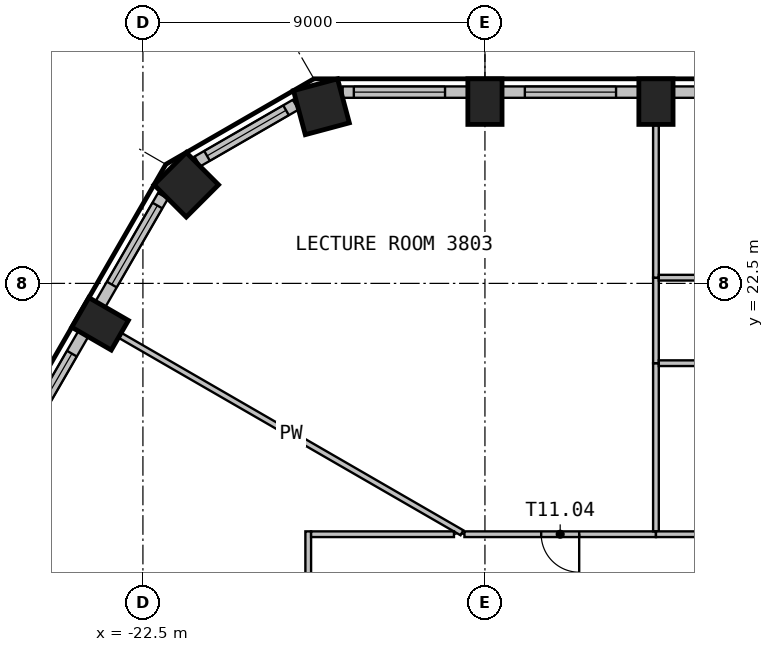
"""IFC4 building model, lengths in metres.
Left out: names, types, materials, properties, quantities, classifications, styles, units other than length and angle.
Written with IfcOpenShell. Run it as: python <this file> out.ifc"""

import sys

from ifc_helpers import new_model, si_unit, direction, frame, frame_2d, origin, origin_2d, place, context, subcontext, project, spatial, rectangle, extrude, element, fill, save


model = new_model("IFC4")
c1 = context("Model", 3, precision=1e-05, world=origin(), true_north=direction((0.0, 1.0)))
c2 = subcontext(c1, "Body", "Model", "MODEL_VIEW")
j1 = project(units=[si_unit("LENGTHUNIT", "METRE"), si_unit("PLANEANGLEUNIT", "RADIAN")], contexts=[c1])
p1 = place(None, origin())
s1 = spatial("IfcSite", under=j1, at=p1, CompositionType="ELEMENT")
p2 = place(p1, origin())
s2 = spatial("IfcBuilding", under=s1, at=p2, CompositionType="ELEMENT")
p3 = place(p2, frame((0.0, 0.0, 156.0)))
s3 = spatial("IfcBuildingStorey", under=s2, at=p3, CompositionType="ELEMENT", Elevation=156.0)
for number, where, z_axis, x_axis in (
    (1, (-9.0, 27.283, 0.0), (0.0, 0.0, 1.0), (-1.0, 0.0, 0.0)),
    (2, (-13.5, 27.283, 0.0), (0.0, 0.0, 1.0), (-1.0, 0.0, 0.0)),
):
    element("IfcColumn", number, at=place(p3, frame(where, z_axis=z_axis, x_axis=x_axis)), inside=s3, PredefinedType="COLUMN", context=c2, shape_type="SweptSolid", body=[
        extrude(rectangle(XDim=0.9, YDim=1.2, at=origin_2d()), origin(), (0.0, 0.0, 1.0), 3.575),
    ])
for number, where, z_axis, x_axis in (
    (3, (-17.803, 27.148, 0.0), (0.0, 0.0, 1.0), (-0.966, -0.259, 0.0)),
    (4, (-21.359, 25.095, 0.0), (0.0, 0.0, 1.0), (-0.707, -0.707, 0.0)),
):
    element("IfcColumn", number, at=place(p3, frame(where, z_axis=z_axis, x_axis=x_axis)), inside=s3, PredefinedType="COLUMN", context=c2, shape_type="SweptSolid", body=[
        extrude(rectangle(XDim=1.2, YDim=1.2, at=origin_2d()), origin(), (0.0, 0.0, 1.0), 3.575),
    ])
p4 = place(p3, frame((-23.627, 21.436, 0.0), z_axis=(0.0, 0.0, 1.0), x_axis=(-0.5, -0.866025403784, 0.0)))
e5 = element("IfcColumn", 5, at=p4, inside=s3, PredefinedType="COLUMN", context=c2, shape_type="SweptSolid", body=[
    extrude(rectangle(XDim=0.9, YDim=1.2, at=origin_2d()), origin(), (0.0, 0.0, 1.0), 3.575),
])
p5 = place(p3, frame((-4.95, 27.533, 0.0), z_axis=(0.0, 0.0, 1.0), x_axis=(-1.0, 0.0, 0.0)))
e6 = element("IfcWall", 6, at=p5, inside=s3, PredefinedType="SOLIDWALL", context=c2, shape_type="SweptSolid", body=[
    extrude(rectangle(XDim=3.599, YDim=0.3, at=frame_2d((1.8, 0.0))), origin(), (0.0, 0.0, 1.0), 3.575),
])
p6 = place(p5, frame((0.6, 0.0, 0.9)))
e7 = element("IfcOpeningElement", 7, at=p6, cuts=e6, PredefinedType="OPENING", context=c2, shape_type="SweptSolid", body=[
    extrude(rectangle(XDim=2.4, YDim=2.1, at=frame_2d((1.2, 1.05))), frame((0.0, 0.16, 0.0), z_axis=(0.0, -1.0, 0.0), x_axis=(1.0, 0.0, 0.0)), (0.0, 0.0, 1.0), 0.32),
])
p7 = place(p3, frame((-9.45, 27.533, 0.0), z_axis=(0.0, 0.0, 1.0), x_axis=(-1.0, 0.0, 0.0)))
e8 = element("IfcWall", 8, at=p7, inside=s3, PredefinedType="SOLIDWALL", context=c2, shape_type="SweptSolid", body=[
    extrude(rectangle(XDim=3.599, YDim=0.3, at=frame_2d((1.8, 0.0))), origin(), (0.0, 0.0, 1.0), 3.575),
])
p8 = place(p7, frame((0.6, 0.0, 0.9)))
e9 = element("IfcOpeningElement", 9, at=p8, cuts=e8, PredefinedType="OPENING", context=c2, shape_type="SweptSolid", body=[
    extrude(rectangle(XDim=2.4, YDim=2.1, at=frame_2d((1.2, 1.05))), frame((0.0, 0.16, 0.0), z_axis=(0.0, -1.0, 0.0), x_axis=(1.0, 0.0, 0.0)), (0.0, 0.0, 1.0), 0.32),
])
p9 = place(p3, frame((-13.95, 27.533, 0.0), z_axis=(0.0, 0.0, 1.0), x_axis=(-1.0, 0.0, 0.0)))
e10 = element("IfcWall", 10, at=p9, inside=s3, PredefinedType="SOLIDWALL", context=c2, shape_type="SweptSolid", body=[
    extrude(rectangle(XDim=3.294, YDim=0.3, at=frame_2d((1.647, 0.0))), origin(), (0.0, 0.0, 1.0), 3.575),
])
p10 = place(p9, frame((0.6, 0.0, 0.9)))
e11 = element("IfcOpeningElement", 11, at=p10, cuts=e10, PredefinedType="OPENING", context=c2, shape_type="SweptSolid", body=[
    extrude(rectangle(XDim=2.4, YDim=2.1, at=frame_2d((1.2, 1.05))), frame((0.0, 0.16, 0.0), z_axis=(0.0, -1.0, 0.0), x_axis=(1.0, 0.0, 0.0)), (0.0, 0.0, 1.0), 0.32),
])
p11 = place(p3, frame((-18.479, 27.202, 0.0), z_axis=(0.0, 0.0, 1.0), x_axis=(-0.866012844897, -0.500021752, 0.0)))
e12 = element("IfcWall", 12, at=p11, inside=s3, PredefinedType="SOLIDWALL", context=c2, shape_type="SweptSolid", body=[
    extrude(rectangle(XDim=2.989, YDim=0.3, at=frame_2d((1.495, 0.0))), origin(), (0.0, 0.0, 1.0), 3.575),
])
p12 = place(p11, frame((0.295, 0.0, 0.9)))
e13 = element("IfcOpeningElement", 13, at=p12, cuts=e12, PredefinedType="OPENING", context=c2, shape_type="SweptSolid", body=[
    extrude(rectangle(XDim=2.4, YDim=2.1, at=frame_2d((1.2, 1.05))), frame((0.0, 0.16, 0.0), z_axis=(0.0, -1.0, 0.0), x_axis=(1.0, 0.0, 0.0)), (0.0, 0.0, 1.0), 0.32),
])
p13 = place(p3, frame((-21.972, 24.803, 0.0), z_axis=(0.0, 0.0, 1.0), x_axis=(-0.500036802197, -0.866004154983, 0.0)))
e14 = element("IfcWall", 14, at=p13, inside=s3, PredefinedType="SOLIDWALL", context=c2, shape_type="SweptSolid", body=[
    extrude(rectangle(XDim=3.294, YDim=0.3, at=frame_2d((1.647, 0.0))), origin(), (0.0, 0.0, 1.0), 3.575),
])
p14 = place(p13, frame((0.294, 0.0, 0.9)))
e15 = element("IfcOpeningElement", 15, at=p14, cuts=e14, PredefinedType="OPENING", context=c2, shape_type="SweptSolid", body=[
    extrude(rectangle(XDim=2.4, YDim=2.1, at=frame_2d((1.2, 1.05))), frame((0.0, 0.16, 0.0), z_axis=(0.0, -1.0, 0.0), x_axis=(1.0, 0.0, 0.0)), (0.0, 0.0, 1.0), 0.32),
])
p15 = place(p3, frame((-24.069, 21.17, 0.0), z_axis=(0.0, 0.0, 1.0), x_axis=(-0.500027802648, -0.866009351323, 0.0)))
e16 = element("IfcWall", 16, at=p15, inside=s3, PredefinedType="SOLIDWALL", context=c2, shape_type="SweptSolid", body=[
    extrude(rectangle(XDim=3.599, YDim=0.3, at=frame_2d((1.799, 0.0))), origin(), (0.0, 0.0, 1.0), 3.575),
])
p16 = place(p15, frame((0.6, 0.0, 0.9)))
e17 = element("IfcOpeningElement", 17, at=p16, cuts=e16, PredefinedType="OPENING", context=c2, shape_type="SweptSolid", body=[
    extrude(rectangle(XDim=2.4, YDim=2.1, at=frame_2d((1.2, 1.05))), frame((0.0, 0.16, 0.0), z_axis=(0.0, -1.0, 0.0), x_axis=(1.0, 0.0, 0.0)), (0.0, 0.0, 1.0), 0.32),
])
p17 = place(p3, frame((-23.09, 21.126, 0.0), z_axis=(0.0, 0.0, 1.0), x_axis=(0.86599279096, -0.500056482814, 0.0)))
e18 = element("IfcWall", 18, at=p17, inside=s3, PredefinedType="PARTITIONING", context=c2, shape_type="SweptSolid", body=[
    extrude(rectangle(XDim=10.376, YDim=0.15, at=frame_2d((5.188, 0.0))), origin(), (0.0, 0.0, 1.0), 3.575),
])
p18 = place(p3, frame((-18.15, 15.975, 0.0), z_axis=(0.0, 0.0, 1.0), x_axis=(0.0, -1.0, 0.0)))
e19 = element("IfcWall", 19, at=p18, inside=s3, PredefinedType="PARTITIONING", context=c2, shape_type="SweptSolid", body=[
    extrude(rectangle(XDim=13.65, YDim=0.15, at=frame_2d((6.825, 0.0))), origin(), (0.0, 0.0, 1.0), 3.575),
])
p19 = place(p3, frame((-14.315, 15.9, 0.0), z_axis=(0.0, 0.0, 1.0), x_axis=(-1.0, 0.0, 0.0)))
e20 = element("IfcWall", 20, at=p19, inside=s3, PredefinedType="PARTITIONING", context=c2, shape_type="SweptSolid", body=[
    extrude(rectangle(XDim=3.76, YDim=0.15, at=frame_2d((1.88, 0.0))), origin(), (0.0, 0.0, 1.0), 3.575),
])
p20 = place(p3, frame((-9.0, 15.9, 0.0), z_axis=(0.0, 0.0, 1.0), x_axis=(-1.0, 0.0, 0.0)))
e21 = element("IfcWall", 21, at=p20, inside=s3, PredefinedType="PARTITIONING", context=c2, shape_type="SweptSolid", body=[
    extrude(rectangle(XDim=5.04, YDim=0.15, at=frame_2d((2.52, 0.0))), origin(), (0.0, 0.0, 1.0), 3.575),
])
p21 = place(p20, frame((2.02, 0.0, 0.0)))
e22 = element("IfcOpeningElement", 22, at=p21, cuts=e21, PredefinedType="OPENING", context=c2, shape_type="SweptSolid", body=[
    extrude(rectangle(XDim=1.0, YDim=2.1, at=frame_2d((0.5, 1.05))), frame((0.0, 0.085, 0.0), z_axis=(0.0, -1.0, 0.0), x_axis=(1.0, 0.0, 0.0)), (0.0, 0.0, 1.0), 0.17),
])
p22 = place(p3, frame((-9.0, 20.4, 0.0), z_axis=(0.0, 0.0, 1.0), x_axis=(0.0, -1.0, 0.0)))
e23 = element("IfcWall", 23, at=p22, inside=s3, PredefinedType="PARTITIONING", context=c2, shape_type="SweptSolid", body=[
    extrude(rectangle(XDim=4.425, YDim=0.15, at=frame_2d((2.212, 0.0))), origin(), (0.0, 0.0, 1.0), 3.575),
])
p23 = place(p3, frame((0.075, 15.9, 0.0), z_axis=(0.0, 0.0, 1.0), x_axis=(-1.0, 0.0, 0.0)))
e24 = element("IfcWall", 24, at=p23, inside=s3, PredefinedType="PARTITIONING", context=c2, shape_type="SweptSolid", body=[
    extrude(rectangle(XDim=9.075, YDim=0.15, at=frame_2d((4.538, 0.0))), origin(), (0.0, 0.0, 1.0), 3.575),
])
p24 = place(p23, frame((4.038, 0.0, 0.0)))
e25 = element("IfcOpeningElement", 25, at=p24, cuts=e24, PredefinedType="OPENING", context=c2, shape_type="SweptSolid", body=[
    extrude(rectangle(XDim=1.0, YDim=2.1, at=frame_2d((0.5, 1.05))), frame((0.0, 0.085, 0.0), z_axis=(0.0, -1.0, 0.0), x_axis=(1.0, 0.0, 0.0)), (0.0, 0.0, 1.0), 0.17),
])
p25 = place(p3, frame((-9.0, 22.65, 0.0), z_axis=(0.0, 0.0, 1.0), x_axis=(0.0, -1.0, 0.0)))
e26 = element("IfcWall", 26, at=p25, inside=s3, PredefinedType="PARTITIONING", context=c2, shape_type="SweptSolid", body=[
    extrude(rectangle(XDim=2.25, YDim=0.15, at=frame_2d((1.125, 0.0))), origin(), (0.0, 0.0, 1.0), 3.575),
])
p26 = place(p3, frame((-8.925, 20.4, 0.0), z_axis=(0.0, 0.0, 1.0), x_axis=(1.0, 0.0, 0.0)))
e27 = element("IfcWall", 27, at=p26, inside=s3, PredefinedType="PARTITIONING", context=c2, shape_type="SweptSolid", body=[
    extrude(rectangle(XDim=8.85, YDim=0.15, at=frame_2d((4.425, 0.0))), origin(), (0.0, 0.0, 1.0), 3.575),
])
p27 = place(p3, frame((-9.0, 26.663, 0.0), z_axis=(0.0, 0.0, 1.0), x_axis=(0.0, -1.0, 0.0)))
e28 = element("IfcWall", 28, at=p27, inside=s3, PredefinedType="MOVABLE", context=c2, shape_type="SweptSolid", body=[
    extrude(rectangle(XDim=4.013, YDim=0.15, at=frame_2d((2.006, 0.0))), origin(), (0.0, 0.0, 1.0), 3.575),
])
p28 = place(p3, frame((-8.925, 22.65, 0.0), z_axis=(0.0, 0.0, 1.0), x_axis=(1.0, 0.0, 0.0)))
e29 = element("IfcWall", 29, at=p28, inside=s3, PredefinedType="PARTITIONING", context=c2, shape_type="SweptSolid", body=[
    extrude(rectangle(XDim=8.85, YDim=0.15, at=frame_2d((4.425, 0.0))), origin(), (0.0, 0.0, 1.0), 3.575),
])
p29 = place(p8, origin())
e30 = element("IfcWindow", 30, at=p29, inside=s3, PartitioningType="SINGLE_PANEL", PredefinedType="WINDOW", context=c2, shape_type="SweptSolid", body=[
    extrude(rectangle(XDim=2.4, YDim=2.1, at=frame_2d((1.2, 1.05))), frame((0.0, 0.03, 0.0), z_axis=(0.0, -1.0, 0.0), x_axis=(1.0, 0.0, 0.0)), (0.0, 0.0, 1.0), 0.06),
])
fill(e9, e30)
p30 = place(p10, origin())
e31 = element("IfcWindow", 31, at=p30, inside=s3, PartitioningType="SINGLE_PANEL", PredefinedType="WINDOW", context=c2, shape_type="SweptSolid", body=[
    extrude(rectangle(XDim=2.4, YDim=2.1, at=frame_2d((1.2, 1.05))), frame((0.0, 0.03, 0.0), z_axis=(0.0, -1.0, 0.0), x_axis=(1.0, 0.0, 0.0)), (0.0, 0.0, 1.0), 0.06),
])
fill(e11, e31)
p31 = place(p12, origin())
e32 = element("IfcWindow", 32, at=p31, inside=s3, PartitioningType="SINGLE_PANEL", PredefinedType="WINDOW", context=c2, shape_type="SweptSolid", body=[
    extrude(rectangle(XDim=2.4, YDim=2.1, at=frame_2d((1.2, 1.05))), frame((0.0, 0.03, 0.0), z_axis=(0.0, -1.0, 0.0), x_axis=(1.0, 0.0, 0.0)), (0.0, 0.0, 1.0), 0.06),
])
fill(e13, e32)
p32 = place(p14, origin())
e33 = element("IfcWindow", 33, at=p32, inside=s3, PartitioningType="SINGLE_PANEL", PredefinedType="WINDOW", context=c2, shape_type="SweptSolid", body=[
    extrude(rectangle(XDim=2.4, YDim=2.1, at=frame_2d((1.2, 1.05))), frame((0.0, 0.03, 0.0), z_axis=(0.0, -1.0, 0.0), x_axis=(1.0, 0.0, 0.0)), (0.0, 0.0, 1.0), 0.06),
])
fill(e15, e33)
p33 = place(p16, origin())
e34 = element("IfcWindow", 34, at=p33, inside=s3, PartitioningType="SINGLE_PANEL", PredefinedType="WINDOW", context=c2, shape_type="SweptSolid", body=[
    extrude(rectangle(XDim=2.4, YDim=2.1, at=frame_2d((1.2, 1.05))), frame((0.0, 0.03, 0.0), z_axis=(0.0, -1.0, 0.0), x_axis=(1.0, 0.0, 0.0)), (0.0, 0.0, 1.0), 0.06),
])
fill(e17, e34)
p34 = place(p21, origin())
e35 = element("IfcDoor", 35, at=p34, inside=s3, OperationType="SINGLE_SWING_LEFT", PredefinedType="DOOR", context=c2, shape_type="SweptSolid", body=[
    extrude(rectangle(XDim=1.0, YDim=2.1, at=frame_2d((0.5, 1.05))), frame((0.0, 0.025, 0.0), z_axis=(0.0, -1.0, 0.0), x_axis=(1.0, 0.0, 0.0)), (0.0, 0.0, 1.0), 0.05),
])
fill(e22, e35)
save(model, sys.argv[1])
